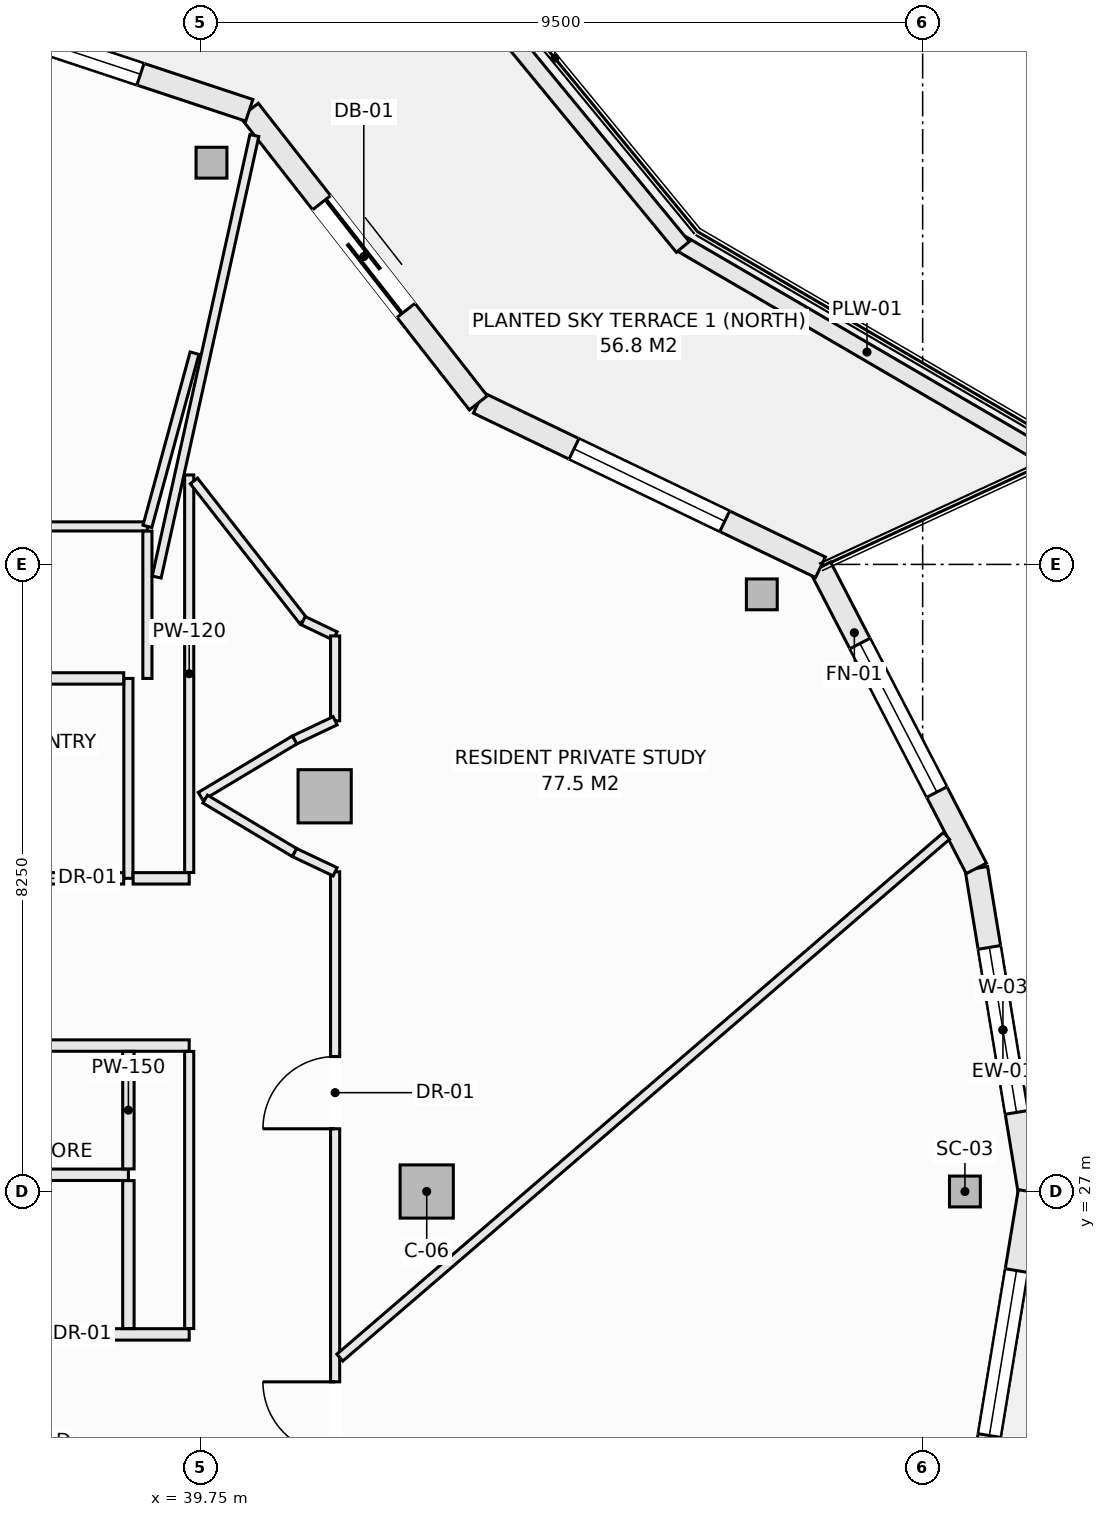
"""IFC4 building model, lengths in metres.
Left out: names, types, materials, properties, quantities, classifications, styles, units other than length and angle.
Written with IfcOpenShell. Run it as: python <this file> out.ifc"""

import sys

from ifc_helpers import new_model, si_unit, direction, frame, frame_2d, origin, origin_2d, place, context, subcontext, project, spatial, rectangle, hollow_rectangle, extrude, element, fill, save


model = new_model("IFC4")
c1 = context("Model", 3, precision=1e-05, world=origin(), true_north=direction((0.0, 1.0)))
c2 = subcontext(c1, "Body", "Model", "MODEL_VIEW")
j1 = project(units=[si_unit("LENGTHUNIT", "METRE"), si_unit("PLANEANGLEUNIT", "RADIAN")], contexts=[c1])
p1 = place(None, origin())
s1 = spatial("IfcSite", under=j1, at=p1, CompositionType="ELEMENT")
p2 = place(p1, origin())
s2 = spatial("IfcBuilding", under=s1, at=p2, CompositionType="ELEMENT")
p3 = place(p2, frame((0.0, 0.0, 262.4)))
s3 = spatial("IfcBuildingStorey", under=s2, at=p3, CompositionType="ELEMENT", Elevation=262.4)
for number, where, z_axis, x_axis in (
    (1, (49.806, 27.0, -0.27), (0.0, 0.0, 1.0), (1.0, 0.0, 0.0)),
    (2, (47.134, 34.856, -0.27), (0.0, 0.0, 1.0), (1.0, 0.0, 0.0)),
    (3, (39.893, 40.535, -0.27), (0.0, 0.0, 1.0), (1.0, 0.0, 0.0)),
):
    element("IfcColumn", number, at=place(p3, frame(where, z_axis=z_axis, x_axis=x_axis)), inside=s3, PredefinedType="COLUMN", context=c2, shape_type="SweptSolid", body=[
        extrude(hollow_rectangle(XDim=0.406, YDim=0.406, WallThickness=0.016, at=origin_2d()), origin(), (0.0, 0.0, 1.0), 3.3),
    ])
for number, where, z_axis, x_axis in (
    (4, (42.725, 27.0, -0.27), (0.0, 0.0, 1.0), (1.0, 0.0, 0.0)),
    (5, (41.382, 32.199, -0.27), (0.0, 0.0, 1.0), (1.0, 0.0, 0.0)),
):
    element("IfcColumn", number, at=place(p3, frame(where, z_axis=z_axis, x_axis=x_axis)), inside=s3, PredefinedType="COLUMN", context=c2, shape_type="SweptSolid", body=[
        extrude(rectangle(XDim=0.7, YDim=0.7, at=origin_2d()), origin(), (0.0, 0.0, 1.0), 3.3),
    ])
p4 = place(p3, frame((49.957, 31.251, 0.0), z_axis=(0.0, 0.0, 1.0), x_axis=(0.162404622434, -0.98672424649, 0.0)))
e6 = element("IfcWall", 6, at=p4, inside=s3, PredefinedType="SOLIDWALL", context=c2, shape_type="SweptSolid", body=[
    extrude(rectangle(XDim=4.308, YDim=0.3, at=frame_2d((2.154, 0.0))), origin(), (0.0, 0.0, 1.0), 2.605),
])
p5 = place(p4, frame((1.054, 0.0, 0.72)))
e7 = element("IfcOpeningElement", 7, at=p5, cuts=e6, PredefinedType="OPENING", context=c2, shape_type="SweptSolid", body=[
    extrude(rectangle(XDim=2.2, YDim=1.65, at=frame_2d((1.1, 0.825))), frame((0.0, 0.16, 0.0), z_axis=(0.0, -1.0, 0.0), x_axis=(1.0, 0.0, 0.0)), (0.0, 0.0, 1.0), 0.32),
])
p6 = place(p3, frame((47.906, 35.212, 0.0), z_axis=(0.0, 0.0, 1.0), x_axis=(0.459801070243, -0.888021945564, 0.0)))
e8 = element("IfcWall", 8, at=p6, inside=s3, PredefinedType="SOLIDWALL", context=c2, shape_type="SweptSolid", body=[
    extrude(rectangle(XDim=4.461, YDim=0.3, at=frame_2d((2.23, 0.0))), origin(), (0.0, 0.0, 1.0), 2.605),
])
p7 = place(p6, frame((1.13, 0.0, 0.72)))
e9 = element("IfcOpeningElement", 9, at=p7, cuts=e8, PredefinedType="OPENING", context=c2, shape_type="SweptSolid", body=[
    extrude(rectangle(XDim=2.2, YDim=1.65, at=frame_2d((1.1, 0.825))), frame((0.0, 0.16, 0.0), z_axis=(0.0, -1.0, 0.0), x_axis=(1.0, 0.0, 0.0)), (0.0, 0.0, 1.0), 0.32),
])
p8 = place(p3, frame((43.404, 37.375, 0.0), z_axis=(0.0, 0.0, 1.0), x_axis=(0.901346013132, -0.433099716706, 0.0)))
e10 = element("IfcWall", 10, at=p8, inside=s3, PredefinedType="SOLIDWALL", context=c2, shape_type="SweptSolid", body=[
    extrude(rectangle(XDim=4.994, YDim=0.3, at=frame_2d((2.497, 0.0))), origin(), (0.0, 0.0, 1.0), 2.605),
])
p9 = place(p8, frame((1.397, 0.0, 0.72)))
e11 = element("IfcOpeningElement", 11, at=p9, cuts=e10, PredefinedType="OPENING", context=c2, shape_type="SweptSolid", body=[
    extrude(rectangle(XDim=2.2, YDim=1.65, at=frame_2d((1.1, 0.825))), frame((0.0, 0.16, 0.0), z_axis=(0.0, -1.0, 0.0), x_axis=(1.0, 0.0, 0.0)), (0.0, 0.0, 1.0), 0.32),
])
p10 = place(p3, frame((40.391, 41.225, 0.0), z_axis=(0.0, 0.0, 1.0), x_axis=(0.616413297421, -0.78742278781, 0.0)))
e12 = element("IfcWall", 12, at=p10, inside=s3, PredefinedType="SOLIDWALL", context=c2, shape_type="SweptSolid", body=[
    extrude(rectangle(XDim=4.888, YDim=0.3, at=frame_2d((2.444, 0.0))), origin(), (0.0, 0.0, 1.0), 2.605),
])
p11 = place(p10, frame((1.544, 0.0, 0.0)))
e13 = element("IfcOpeningElement", 13, at=p11, cuts=e12, PredefinedType="OPENING", context=c2, shape_type="SweptSolid", body=[
    extrude(rectangle(XDim=1.8, YDim=2.25, at=frame_2d((0.9, 1.125))), frame((0.0, 0.16, 0.0), z_axis=(0.0, -1.0, 0.0), x_axis=(1.0, 0.0, 0.0)), (0.0, 0.0, 1.0), 0.32),
])
p12 = place(p3, frame((35.439, 42.865, 0.0), z_axis=(0.0, 0.0, 1.0), x_axis=(0.949252744709, -0.314514271001, 0.0)))
e14 = element("IfcWall", 14, at=p12, inside=s3, PredefinedType="SOLIDWALL", context=c2, shape_type="SweptSolid", body=[
    extrude(rectangle(XDim=5.216, YDim=0.3, at=frame_2d((2.608, 0.0))), origin(), (0.0, 0.0, 1.0), 2.605),
])
p13 = place(p12, frame((1.508, 0.0, 0.72)))
e15 = element("IfcOpeningElement", 15, at=p13, cuts=e14, PredefinedType="OPENING", context=c2, shape_type="SweptSolid", body=[
    extrude(rectangle(XDim=2.2, YDim=1.65, at=frame_2d((1.1, 0.825))), frame((0.0, 0.16, 0.0), z_axis=(0.0, -1.0, 0.0), x_axis=(1.0, 0.0, 0.0)), (0.0, 0.0, 1.0), 0.32),
])
p14 = place(p3, frame((49.957, 22.749, 0.0), z_axis=(0.0, 0.0, 1.0), x_axis=(0.162404622434, 0.98672424649, 0.0)))
e16 = element("IfcWall", 16, at=p14, inside=s3, PredefinedType="SOLIDWALL", context=c2, shape_type="SweptSolid", body=[
    extrude(rectangle(XDim=4.308, YDim=0.3, at=frame_2d((2.154, 0.0))), origin(), (0.0, 0.0, 1.0), 2.605),
])
p15 = place(p14, frame((1.054, 0.0, 0.72)))
e17 = element("IfcOpeningElement", 17, at=p15, cuts=e16, PredefinedType="OPENING", context=c2, shape_type="SweptSolid", body=[
    extrude(rectangle(XDim=2.2, YDim=1.65, at=frame_2d((1.1, 0.825))), frame((0.0, 0.16, 0.0), z_axis=(0.0, -1.0, 0.0), x_axis=(1.0, 0.0, 0.0)), (0.0, 0.0, 1.0), 0.32),
])
p16 = place(p3, frame((46.048, 39.485, 0.0), z_axis=(0.0, 0.0, 1.0), x_axis=(0.863803671285, -0.503828559606, 0.0)))
e18 = element("IfcWall", 18, at=p16, inside=s3, PredefinedType="PARAPET", context=c2, shape_type="SweptSolid", body=[
    extrude(rectangle(XDim=5.719, YDim=0.22, at=frame_2d((2.86, 0.0))), origin(), (0.0, 0.0, 1.0), 0.52),
])
p17 = place(p3, frame((42.339, 43.99, 0.0), z_axis=(0.0, 0.0, 1.0), x_axis=(0.635450933862, -0.772141250455, 0.0)))
e19 = element("IfcWall", 19, at=p17, inside=s3, PredefinedType="PARAPET", context=c2, shape_type="SweptSolid", body=[
    extrude(rectangle(XDim=5.91, YDim=0.22, at=frame_2d((2.955, 0.0))), origin(), (0.0, 0.0, 1.0), 0.52),
])
p18 = place(p3, frame((30.077, 28.92, 0.0), z_axis=(0.0, 0.0, 1.0), x_axis=(1.0, 0.0, 0.0)))
e20 = element("IfcWall", 20, at=p18, inside=s3, PredefinedType="PARTITIONING", context=c2, shape_type="SweptSolid", body=[
    extrude(rectangle(XDim=9.523, YDim=0.15, at=frame_2d((4.762, 0.0))), origin(), (0.0, 0.0, 1.0), 3.03),
])
p19 = place(p18, frame((1.342, 0.0, 0.0)))
e21 = element("IfcOpeningElement", 21, at=p19, cuts=e20, PredefinedType="OPENING", context=c2, shape_type="SweptSolid", body=[
    extrude(rectangle(XDim=0.95, YDim=2.1, at=frame_2d((0.475, 1.05))), frame((0.0, 0.085, 0.0), z_axis=(0.0, -1.0, 0.0), x_axis=(1.0, 0.0, 0.0)), (0.0, 0.0, 1.0), 0.17),
])
p20 = place(p18, frame((5.498, 0.0, 0.0)))
e22 = element("IfcOpeningElement", 22, at=p20, cuts=e20, PredefinedType="OPENING", context=c2, shape_type="SweptSolid", body=[
    extrude(rectangle(XDim=0.95, YDim=2.1, at=frame_2d((0.475, 1.05))), frame((0.0, 0.085, 0.0), z_axis=(0.0, -1.0, 0.0), x_axis=(1.0, 0.0, 0.0)), (0.0, 0.0, 1.0), 0.17),
])
p21 = place(p3, frame((33.377, 25.12, 0.0), z_axis=(0.0, 0.0, 1.0), x_axis=(1.0, 0.0, 0.0)))
e23 = element("IfcWall", 23, at=p21, inside=s3, PredefinedType="PARTITIONING", context=c2, shape_type="SweptSolid", body=[
    extrude(rectangle(XDim=6.223, YDim=0.15, at=frame_2d((3.112, 0.0))), origin(), (0.0, 0.0, 1.0), 3.03),
])
p22 = place(p21, frame((2.441, 0.0, 0.0)))
e24 = element("IfcOpeningElement", 24, at=p22, cuts=e23, PredefinedType="OPENING", context=c2, shape_type="SweptSolid", body=[
    extrude(rectangle(XDim=0.95, YDim=2.1, at=frame_2d((0.475, 1.05))), frame((0.0, 0.085, 0.0), z_axis=(0.0, -1.0, 0.0), x_axis=(1.0, 0.0, 0.0)), (0.0, 0.0, 1.0), 0.17),
])
p23 = place(p3, frame((33.377, 27.22, 0.0), z_axis=(0.0, 0.0, 1.0), x_axis=(1.0, 0.0, 0.0)))
e25 = element("IfcWall", 25, at=p23, inside=s3, PredefinedType="PARTITIONING", context=c2, shape_type="SweptSolid", body=[
    extrude(rectangle(XDim=5.423, YDim=0.15, at=frame_2d((2.711, 0.0))), origin(), (0.0, 0.0, 1.0), 3.03),
])
p24 = place(p3, frame((38.8, 25.197, 0.0), z_axis=(0.0, 0.0, 1.0), x_axis=(0.0, 1.0, 0.0)))
e26 = element("IfcWall", 26, at=p24, inside=s3, PredefinedType="PARTITIONING", context=c2, shape_type="SweptSolid", body=[
    extrude(rectangle(XDim=1.946, YDim=0.15, at=frame_2d((0.973, 0.0))), origin(), (0.0, 0.0, 1.0), 3.03),
])
p25 = place(p3, frame((38.8, 27.297, 0.0), z_axis=(0.0, 0.0, 1.0), x_axis=(0.0, 1.0, 0.0)))
e27 = element("IfcWall", 27, at=p25, inside=s3, PredefinedType="PARTITIONING", context=c2, shape_type="SweptSolid", body=[
    extrude(rectangle(XDim=1.546, YDim=0.15, at=frame_2d((0.773, 0.0))), origin(), (0.0, 0.0, 1.0), 3.03),
])
p26 = place(p3, frame((38.8, 31.12, 0.0), z_axis=(0.0, 0.0, 1.0), x_axis=(0.0, 1.0, 0.0)))
e28 = element("IfcWall", 28, at=p26, inside=s3, PredefinedType="PARTITIONING", context=c2, shape_type="SweptSolid", body=[
    extrude(rectangle(XDim=2.63, YDim=0.12, at=frame_2d((1.315, 0.0))), origin(), (0.0, 0.0, 1.0), 3.03),
])
p27 = place(p3, frame((30.077, 31.12, 0.0), z_axis=(0.0, 0.0, 1.0), x_axis=(1.0, 0.0, 0.0)))
e29 = element("IfcWall", 29, at=p27, inside=s3, PredefinedType="PARTITIONING", context=c2, shape_type="SweptSolid", body=[
    extrude(rectangle(XDim=8.661, YDim=0.15, at=frame_2d((4.331, 0.0))), origin(), (0.0, 0.0, 1.0), 3.03),
])
p28 = place(p27, frame((1.892, 0.0, 0.0)))
e30 = element("IfcOpeningElement", 30, at=p28, cuts=e29, PredefinedType="OPENING", context=c2, shape_type="SweptSolid", body=[
    extrude(rectangle(XDim=0.95, YDim=2.1, at=frame_2d((0.475, 1.05))), frame((0.0, 0.085, 0.0), z_axis=(0.0, -1.0, 0.0), x_axis=(1.0, 0.0, 0.0)), (0.0, 0.0, 1.0), 0.17),
])
p29 = place(p27, frame((5.812, 0.0, 0.0)))
e31 = element("IfcOpeningElement", 31, at=p29, cuts=e29, PredefinedType="OPENING", context=c2, shape_type="SweptSolid", body=[
    extrude(rectangle(XDim=0.95, YDim=2.1, at=frame_2d((0.475, 1.05))), frame((0.0, 0.085, 0.0), z_axis=(0.0, -1.0, 0.0), x_axis=(1.0, 0.0, 0.0)), (0.0, 0.0, 1.0), 0.17),
])
p30 = place(p3, frame((38.862, 31.12, 0.0), z_axis=(0.0, 0.0, 1.0), x_axis=(1.0, 0.0, 0.0)))
e32 = element("IfcWall", 32, at=p30, inside=s3, PredefinedType="PARTITIONING", context=c2, shape_type="SweptSolid", body=[
    extrude(rectangle(XDim=0.738, YDim=0.15, at=frame_2d((0.369, 0.0))), origin(), (0.0, 0.0, 1.0), 3.03),
])
p31 = place(p3, frame((30.077, 33.75, 0.0), z_axis=(0.0, 0.0, 1.0), x_axis=(1.0, 0.0, 0.0)))
e33 = element("IfcWall", 33, at=p31, inside=s3, PredefinedType="PARTITIONING", context=c2, shape_type="SweptSolid", body=[
    extrude(rectangle(XDim=8.661, YDim=0.15, at=frame_2d((4.331, 0.0))), origin(), (0.0, 0.0, 1.0), 3.03),
])
p32 = place(p3, frame((33.833, 35.75, 0.0), z_axis=(0.0, 0.0, 1.0), x_axis=(1.0, 0.0, 0.0)))
e34 = element("IfcWall", 34, at=p32, inside=s3, PredefinedType="PARTITIONING", context=c2, shape_type="SweptSolid", body=[
    extrude(rectangle(XDim=5.217, YDim=0.12, at=frame_2d((2.608, 0.0))), origin(), (0.0, 0.0, 1.0), 2.478),
])
p33 = place(p32, frame((1.713, 0.0, 0.0)))
e35 = element("IfcOpeningElement", 35, at=p33, cuts=e34, PredefinedType="OPENING", context=c2, shape_type="SweptSolid", body=[
    extrude(rectangle(XDim=0.95, YDim=2.1, at=frame_2d((0.475, 1.05))), frame((0.0, 0.07, 0.0), z_axis=(0.0, -1.0, 0.0), x_axis=(1.0, 0.0, 0.0)), (0.0, 0.0, 1.0), 0.14),
])
p34 = place(p3, frame((39.05, 33.75, 0.0), z_axis=(0.0, 0.0, 1.0), x_axis=(0.0, 1.0, 0.0)))
e36 = element("IfcWall", 36, at=p34, inside=s3, PredefinedType="PARTITIONING", context=c2, shape_type="SweptSolid", body=[
    extrude(rectangle(XDim=1.938, YDim=0.12, at=frame_2d((0.969, 0.0))), origin(), (0.0, 0.0, 1.0), 3.03),
])
p35 = place(p3, frame((39.6, 25.197, 0.0), z_axis=(0.0, 0.0, 1.0), x_axis=(0.0, 1.0, 0.0)))
e37 = element("IfcWall", 37, at=p35, inside=s3, PredefinedType="PARTITIONING", context=c2, shape_type="SweptSolid", body=[
    extrude(rectangle(XDim=3.646, YDim=0.12, at=frame_2d((1.823, 0.0))), origin(), (0.0, 0.0, 1.0), 3.03),
])
p36 = place(p3, frame((39.6, 31.197, 0.0), z_axis=(0.0, 0.0, 1.0), x_axis=(0.0, 1.0, 0.0)))
e38 = element("IfcWall", 38, at=p36, inside=s3, PredefinedType="PARTITIONING", context=c2, shape_type="SweptSolid", body=[
    extrude(rectangle(XDim=5.23, YDim=0.12, at=frame_2d((2.615, 0.0))), origin(), (0.0, 0.0, 1.0), 3.03),
])
p37 = place(p3, frame((39.662, 36.348, 0.0), z_axis=(0.0, 0.0, 1.0), x_axis=(0.616212345115, -0.78758005671, 0.0)))
e39 = element("IfcWall", 39, at=p37, inside=s3, PredefinedType="PARTITIONING", context=c2, shape_type="SweptSolid", body=[
    extrude(rectangle(XDim=2.333, YDim=0.12, at=frame_2d((1.167, 0.0))), origin(), (0.0, 0.0, 1.0), 3.03),
])
p38 = place(p3, frame((41.1, 34.51, 0.0), z_axis=(0.0, 0.0, 1.0), x_axis=(0.902054328377, -0.431622507125, 0.0)))
e40 = element("IfcWall", 40, at=p38, inside=s3, PredefinedType="PARTITIONING", context=c2, shape_type="SweptSolid", body=[
    extrude(rectangle(XDim=0.466, YDim=0.12, at=frame_2d((0.233, 0.0))), origin(), (0.0, 0.0, 1.0), 3.03),
])
p39 = place(p3, frame((41.52, 22.794, 0.0), z_axis=(0.0, 0.0, 1.0), x_axis=(0.0, 1.0, 0.0)))
e41 = element("IfcWall", 41, at=p39, inside=s3, PredefinedType="PARTITIONING", context=c2, shape_type="SweptSolid", body=[
    extrude(rectangle(XDim=8.412, YDim=0.12, at=frame_2d((4.206, 0.0))), origin(), (0.0, 0.0, 1.0), 2.478),
])
p40 = place(p39, frame((0.752, 0.0, 0.0)))
e42 = element("IfcOpeningElement", 42, at=p40, cuts=e41, PredefinedType="OPENING", context=c2, shape_type="SweptSolid", body=[
    extrude(rectangle(XDim=0.95, YDim=2.1, at=frame_2d((0.475, 1.05))), frame((0.0, 0.07, 0.0), z_axis=(0.0, -1.0, 0.0), x_axis=(1.0, 0.0, 0.0)), (0.0, 0.0, 1.0), 0.14),
])
p41 = place(p39, frame((5.031, 0.0, 0.0)))
e43 = element("IfcOpeningElement", 43, at=p41, cuts=e41, PredefinedType="OPENING", context=c2, shape_type="SweptSolid", body=[
    extrude(rectangle(XDim=0.95, YDim=2.1, at=frame_2d((0.475, 1.05))), frame((0.0, 0.07, 0.0), z_axis=(0.0, -1.0, 0.0), x_axis=(1.0, 0.0, 0.0)), (0.0, 0.0, 1.0), 0.14),
])
p42 = place(p3, frame((41.52, 33.193, 0.0), z_axis=(0.0, 0.0, 1.0), x_axis=(0.0, 1.0, 0.0)))
e44 = element("IfcWall", 44, at=p42, inside=s3, PredefinedType="PARTITIONING", context=c2, shape_type="SweptSolid", body=[
    extrude(rectangle(XDim=1.116, YDim=0.12, at=frame_2d((0.558, 0.0))), origin(), (0.0, 0.0, 1.0), 3.03),
])
p43 = place(p3, frame((40.986, 32.94, 0.0), z_axis=(0.0, 0.0, 1.0), x_axis=(0.90356951601, 0.428441512621, 0.0)))
e45 = element("IfcWall", 45, at=p43, inside=s3, PredefinedType="PARTITIONING", context=c2, shape_type="SweptSolid", body=[
    extrude(rectangle(XDim=0.591, YDim=0.12, at=frame_2d((0.295, 0.0))), origin(), (0.0, 0.0, 1.0), 3.03),
])
p44 = place(p3, frame((39.75, 32.199, 0.0), z_axis=(0.0, 0.0, 1.0), x_axis=(0.857702120906, 0.514146935996, 0.0)))
e46 = element("IfcWall", 46, at=p44, inside=s3, PredefinedType="PARTITIONING", context=c2, shape_type="SweptSolid", body=[
    extrude(rectangle(XDim=1.441, YDim=0.12, at=frame_2d((0.721, 0.0))), origin(), (0.0, 0.0, 1.0), 3.03),
])
p45 = place(p3, frame((39.81, 32.163, 0.0), z_axis=(0.0, 0.0, 1.0), x_axis=(0.858011245414, -0.513630901273, 0.0)))
e47 = element("IfcWall", 47, at=p45, inside=s3, PredefinedType="PARTITIONING", context=c2, shape_type="SweptSolid", body=[
    extrude(rectangle(XDim=1.37, YDim=0.12, at=frame_2d((0.685, 0.0))), origin(), (0.0, 0.0, 1.0), 3.03),
])
p46 = place(p3, frame((40.986, 31.459, 0.0), z_axis=(0.0, 0.0, 1.0), x_axis=(0.903729424576, -0.428104107847, 0.0)))
e48 = element("IfcWall", 48, at=p46, inside=s3, PredefinedType="PARTITIONING", context=c2, shape_type="SweptSolid", body=[
    extrude(rectangle(XDim=0.591, YDim=0.12, at=frame_2d((0.295, 0.0))), origin(), (0.0, 0.0, 1.0), 3.03),
])
p47 = place(p3, frame((41.582, 24.814, 0.0), z_axis=(0.0, 0.0, 1.0), x_axis=(0.758204685581, 0.652016606202, 0.0)))
e49 = element("IfcWall", 49, at=p47, inside=s3, PredefinedType="PARTITIONING", context=c2, shape_type="SweptSolid", body=[
    extrude(rectangle(XDim=10.528, YDim=0.12, at=frame_2d((5.264, 0.0))), origin(), (0.0, 0.0, 1.0), 2.478),
])
p48 = place(p3, frame((39.172, 35.083, 0.0), z_axis=(0.0, 0.0, 1.0), x_axis=(0.216048361883, 0.976382663369, 0.0)))
e50 = element("IfcWall", 50, at=p48, inside=s3, PredefinedType="PARTITIONING", context=c2, shape_type="SweptSolid", body=[
    extrude(rectangle(XDim=5.95, YDim=0.12, at=frame_2d((2.975, 0.0))), origin(), (0.0, 0.0, 1.0), 3.03),
])
p49 = place(p3, frame((39.05, 35.75, 0.0), z_axis=(0.0, 0.0, 1.0), x_axis=(0.262548848822, 0.964918702266, 0.0)))
e51 = element("IfcWall", 51, at=p49, inside=s3, PredefinedType="PARTITIONING", context=c2, shape_type="SweptSolid", body=[
    extrude(rectangle(XDim=2.362, YDim=0.12, at=frame_2d((1.181, 0.0))), origin(), (0.0, 0.0, 1.0), 3.03),
])
p50 = place(p5, origin())
e52 = element("IfcWindow", 52, at=p50, inside=s3, PartitioningType="SINGLE_PANEL", PredefinedType="WINDOW", context=c2, shape_type="SweptSolid", body=[
    extrude(rectangle(XDim=2.2, YDim=1.65, at=frame_2d((1.1, 0.825))), frame((0.0, 0.03, 0.0), z_axis=(0.0, -1.0, 0.0), x_axis=(1.0, 0.0, 0.0)), (0.0, 0.0, 1.0), 0.06),
])
fill(e7, e52)
p51 = place(p7, origin())
e53 = element("IfcWindow", 53, at=p51, inside=s3, PartitioningType="SINGLE_PANEL", PredefinedType="WINDOW", context=c2, shape_type="SweptSolid", body=[
    extrude(rectangle(XDim=2.2, YDim=1.65, at=frame_2d((1.1, 0.825))), frame((0.0, 0.03, 0.0), z_axis=(0.0, -1.0, 0.0), x_axis=(1.0, 0.0, 0.0)), (0.0, 0.0, 1.0), 0.06),
])
fill(e9, e53)
p52 = place(p9, origin())
e54 = element("IfcWindow", 54, at=p52, inside=s3, PartitioningType="SINGLE_PANEL", PredefinedType="WINDOW", context=c2, shape_type="SweptSolid", body=[
    extrude(rectangle(XDim=2.2, YDim=1.65, at=frame_2d((1.1, 0.825))), frame((0.0, 0.03, 0.0), z_axis=(0.0, -1.0, 0.0), x_axis=(1.0, 0.0, 0.0)), (0.0, 0.0, 1.0), 0.06),
])
fill(e11, e54)
p53 = place(p11, origin())
e55 = element("IfcDoor", 55, at=p53, inside=s3, OperationType="SLIDING_TO_LEFT", PredefinedType="DOOR", context=c2, shape_type="SweptSolid", body=[
    extrude(rectangle(XDim=1.8, YDim=2.25, at=frame_2d((0.9, 1.125))), frame((0.0, 0.025, 0.0), z_axis=(0.0, -1.0, 0.0), x_axis=(1.0, 0.0, 0.0)), (0.0, 0.0, 1.0), 0.05),
])
fill(e13, e55)
p54 = place(p13, origin())
e56 = element("IfcWindow", 56, at=p54, inside=s3, PartitioningType="SINGLE_PANEL", PredefinedType="WINDOW", context=c2, shape_type="SweptSolid", body=[
    extrude(rectangle(XDim=2.2, YDim=1.65, at=frame_2d((1.1, 0.825))), frame((0.0, 0.03, 0.0), z_axis=(0.0, -1.0, 0.0), x_axis=(1.0, 0.0, 0.0)), (0.0, 0.0, 1.0), 0.06),
])
fill(e15, e56)
p55 = place(p15, origin())
e57 = element("IfcWindow", 57, at=p55, inside=s3, PartitioningType="SINGLE_PANEL", PredefinedType="WINDOW", context=c2, shape_type="SweptSolid", body=[
    extrude(rectangle(XDim=2.2, YDim=1.65, at=frame_2d((1.1, 0.825))), frame((0.0, 0.03, 0.0), z_axis=(0.0, -1.0, 0.0), x_axis=(1.0, 0.0, 0.0)), (0.0, 0.0, 1.0), 0.06),
])
fill(e17, e57)
p56 = place(p40, origin())
e58 = element("IfcDoor", 58, at=p56, inside=s3, OperationType="SINGLE_SWING_RIGHT", PredefinedType="DOOR", context=c2, shape_type="SweptSolid", body=[
    extrude(rectangle(XDim=0.95, YDim=2.1, at=frame_2d((0.475, 1.05))), frame((0.0, 0.025, 0.0), z_axis=(0.0, -1.0, 0.0), x_axis=(1.0, 0.0, 0.0)), (0.0, 0.0, 1.0), 0.05),
])
fill(e42, e58)
p57 = place(p41, origin())
e59 = element("IfcDoor", 59, at=p57, inside=s3, OperationType="SINGLE_SWING_LEFT", PredefinedType="DOOR", context=c2, shape_type="SweptSolid", body=[
    extrude(rectangle(XDim=0.95, YDim=2.1, at=frame_2d((0.475, 1.05))), frame((0.0, 0.025, 0.0), z_axis=(0.0, -1.0, 0.0), x_axis=(1.0, 0.0, 0.0)), (0.0, 0.0, 1.0), 0.05),
])
fill(e43, e59)
save(model, sys.argv[1])
